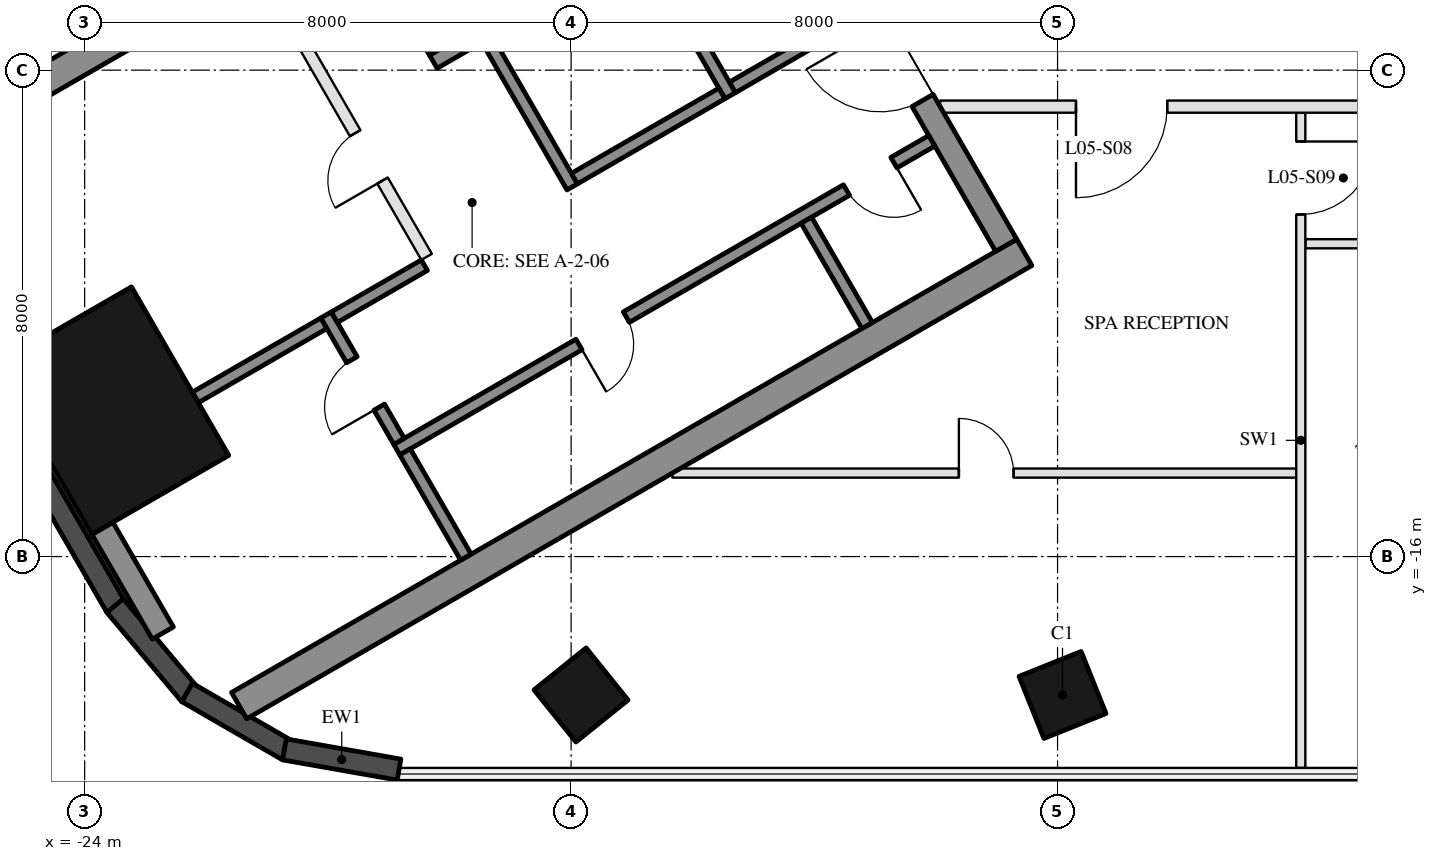
"""IFC4 building model, lengths in metres.
Left out: names, types, materials, properties, quantities, classifications, styles, units other than length and angle.
Written with IfcOpenShell. Run it as: python <this file> out.ifc"""

import sys

from ifc_helpers import new_model, si_unit, direction, frame, frame_2d, origin, origin_2d, place, context, subcontext, project, spatial, rectangle, hollow_rectangle, extrude, boolean, halfspace, element, fill, save


model = new_model("IFC4")
c1 = context("Model", 3, precision=1e-05, world=origin(), true_north=direction((0.0, 1.0)))
c2 = subcontext(c1, "Body", "Model", "MODEL_VIEW")
j1 = project(units=[si_unit("LENGTHUNIT", "METRE"), si_unit("PLANEANGLEUNIT", "RADIAN")], contexts=[c1])
p1 = place(None, origin())
s1 = spatial("IfcSite", under=j1, at=p1, CompositionType="ELEMENT")
p2 = place(p1, origin())
s2 = spatial("IfcBuilding", under=s1, at=p2, CompositionType="ELEMENT")
p3 = place(p2, frame((0.0, 0.0, 33.0)))
s3 = spatial("IfcBuildingStorey", under=s2, at=p3, CompositionType="ELEMENT", Elevation=33.0)
p4 = place(p3, frame((-15.837, -18.276, 0.0), z_axis=(0.008245813936, 0.010253018645, 0.999913437334), x_axis=(-0.999965935277, -0.000282647683, 0.008249145105)))
e1 = element("IfcColumn", 1, at=p4, inside=s3, PredefinedType="COLUMN", context=c2, shape_type="SweptSolid", body=[
    boolean("DIFFERENCE", boolean("DIFFERENCE", extrude(hollow_rectangle(XDim=1.1, YDim=1.1, WallThickness=0.05, at=origin_2d()), origin(), (0.0, 0.0, 1.0), 4.5), halfspace(frame((0.0, 0.0, 0.012), z_axis=(0.0, 0.0, 1.0), x_axis=(1.0, 0.0, 0.0)), True)), halfspace(frame((0.0, 0.0, 4.493), z_axis=(0.0, 0.0, 1.0), x_axis=(1.0, 0.0, 0.0)), False)),
])
p5 = place(p3, frame((-7.918, -18.276, 0.0), z_axis=(0.004123012096, 0.010253280081, 0.999938933645), x_axis=(-0.999991272744, 0.000716936113, 0.004115876508)))
e2 = element("IfcColumn", 2, at=p5, inside=s3, PredefinedType="COLUMN", context=c2, shape_type="SweptSolid", body=[
    boolean("DIFFERENCE", boolean("DIFFERENCE", extrude(hollow_rectangle(XDim=1.1, YDim=1.1, WallThickness=0.05, at=origin_2d()), origin(), (0.0, 0.0, 1.0), 4.5), halfspace(frame((0.0, 0.0, 0.01), z_axis=(0.0, 0.0, 1.0), x_axis=(1.0, 0.0, 0.0)), True)), halfspace(frame((0.0, 0.0, 4.494), z_axis=(0.0, 0.0, 1.0), x_axis=(1.0, 0.0, 0.0)), False)),
])
p6 = place(p3, frame((-23.556, -13.6, 0.0), z_axis=(0.0, 0.0, 1.0), x_axis=(-0.5, 0.866025403784, 0.0)))
e3 = element("IfcColumn", 3, at=p6, inside=s3, PredefinedType="COLUMN", context=c2, shape_type="SweptSolid", body=[
    extrude(hollow_rectangle(XDim=3.2, YDim=2.6, WallThickness=0.08, at=origin_2d()), origin(), (0.0, 0.0, 1.0), 4.5),
])
p7 = place(p3, frame((-26.318, -11.921, 0.0), z_axis=(0.0, 0.0, 1.0), x_axis=(0.499982068559, -0.866035756259, 0.0)))
e4 = element("IfcWall", 4, at=p7, inside=s3, PredefinedType="SOLIDWALL", context=c2, shape_type="SweptSolid", body=[
    extrude(rectangle(XDim=5.671, YDim=0.35, at=frame_2d((2.835, 0.0))), origin(), (0.0, 0.0, 1.0), 4.2),
])
p8 = place(p3, frame((-23.5, -16.807, 0.0), z_axis=(0.0, 0.0, 1.0), x_axis=(0.64282715853, -0.766011255959, 0.0)))
e5 = element("IfcWall", 5, at=p8, inside=s3, PredefinedType="SOLIDWALL", context=c2, shape_type="SweptSolid", body=[
    extrude(rectangle(XDim=1.915, YDim=0.35, at=frame_2d((0.957, 0.0))), origin(), (0.0, 0.0, 1.0), 4.2),
])
p9 = place(p3, frame((-22.316, -18.235, 0.0), z_axis=(0.0, 0.0, 1.0), x_axis=(0.865990234582, -0.500060909899, 0.0)))
e6 = element("IfcWall", 6, at=p9, inside=s3, PredefinedType="SOLIDWALL", context=c2, shape_type="SweptSolid", body=[
    extrude(rectangle(XDim=1.915, YDim=0.35, at=frame_2d((0.958, 0.0))), origin(), (0.0, 0.0, 1.0), 4.2),
])
p10 = place(p3, frame((-20.715, -19.171, 0.0), z_axis=(0.0, 0.0, 1.0), x_axis=(0.984824611058, -0.173552543785, 0.0)))
e7 = element("IfcWall", 7, at=p10, inside=s3, PredefinedType="SOLIDWALL", context=c2, shape_type="SweptSolid", body=[
    extrude(rectangle(XDim=1.915, YDim=0.35, at=frame_2d((0.957, 0.0))), origin(), (0.0, 0.0, 1.0), 4.2),
])
for number, where, z_axis, x_axis in (
    (8, (-13.797, -1.903, 0.0), (0.0, 0.0, 1.0), (-0.866, -0.5, 0.0)),
    (9, (-8.547, -10.997, 0.0), (0.0, 0.0, 1.0), (-0.866, -0.5, 0.0)),
):
    element("IfcWall", number, at=place(p3, frame(where, z_axis=z_axis, x_axis=x_axis)), inside=s3, PredefinedType="SHEAR", context=c2, shape_type="SweptSolid", body=[
        extrude(rectangle(XDim=14.91, YDim=0.5, at=frame_2d((7.455, 0.0))), origin(), (0.0, 0.0, 1.0), 4.2),
    ])
p11 = place(p3, frame((-13.845, -2.22, 0.0), z_axis=(0.0, 0.0, 1.0), x_axis=(0.500004234368, -0.866022959057, 0.0)))
e10 = element("IfcWall", 10, at=p11, inside=s3, PredefinedType="SHEAR", context=c2, shape_type="SweptSolid", body=[
    extrude(rectangle(XDim=10.0, YDim=0.4, at=frame_2d((5.0, 0.0))), origin(), (0.0, 0.0, 1.0), 4.2),
])
p12 = place(p11, frame((3.55, 0.0, 0.0)))
e11 = element("IfcOpeningElement", 11, at=p12, cuts=e10, PredefinedType="OPENING", context=c2, shape_type="SweptSolid", body=[
    extrude(rectangle(XDim=1.1, YDim=2.1, at=frame_2d((0.55, 1.05))), frame((0.0, 0.21, 0.0), z_axis=(0.0, -1.0, 0.0), x_axis=(1.0, 0.0, 0.0)), (0.0, 0.0, 1.0), 0.42),
])
p13 = place(p11, frame((5.85, 0.0, 0.0)))
e12 = element("IfcOpeningElement", 12, at=p13, cuts=e10, PredefinedType="OPENING", context=c2, shape_type="SweptSolid", body=[
    extrude(rectangle(XDim=1.4, YDim=2.1, at=frame_2d((0.7, 1.05))), frame((0.0, 0.21, 0.0), z_axis=(0.0, -1.0, 0.0), x_axis=(1.0, 0.0, 0.0)), (0.0, 0.0, 1.0), 0.42),
])
p14 = place(p3, frame((-23.708, -15.536, 0.0), z_axis=(0.0, 0.0, 1.0), x_axis=(0.499927872096, -0.866067042845, 0.0)))
e13 = element("IfcWall", 13, at=p14, inside=s3, PredefinedType="SHEAR", context=c2, shape_type="SweptSolid", body=[
    extrude(rectangle(XDim=1.989, YDim=0.4, at=frame_2d((0.995, 0.0))), origin(), (0.0, 0.0, 1.0), 4.2),
])
p15 = place(p3, frame((-12.681, -4.636, 0.0), z_axis=(0.0, 0.0, 1.0), x_axis=(-0.866021702275, -0.500006411147, 0.0)))
e14 = element("IfcWall", 14, at=p15, inside=s3, PredefinedType="SHEAR", context=c2, shape_type="SweptSolid", body=[
    extrude(rectangle(XDim=6.45, YDim=0.25, at=frame_2d((3.225, 0.0))), origin(), (0.0, 0.0, 1.0), 4.2),
])
p16 = place(p15, frame((0.3, 0.0, 0.0)))
e15 = element("IfcOpeningElement", 15, at=p16, cuts=e14, PredefinedType="OPENING", context=c2, shape_type="SweptSolid", body=[
    extrude(rectangle(XDim=1.0, YDim=2.1, at=frame_2d((0.5, 1.05))), frame((0.0, 0.135, 0.0), z_axis=(0.0, -1.0, 0.0), x_axis=(1.0, 0.0, 0.0)), (0.0, 0.0, 1.0), 0.27),
])
p17 = place(p3, frame((-19.496, -5.482, 0.0), z_axis=(0.0, 0.0, 1.0), x_axis=(0.499990435942, -0.866030925526, 0.0)))
e16 = element("IfcWall", 16, at=p17, inside=s3, PredefinedType="SHEAR", context=c2, shape_type="SweptSolid", body=[
    extrude(rectangle(XDim=2.55, YDim=0.25, at=frame_2d((1.275, 0.0))), origin(), (0.0, 0.0, 1.0), 4.2),
])
p18 = place(p3, frame((-17.381, -7.495, 0.0), z_axis=(0.0, 0.0, 1.0), x_axis=(0.500011755427, -0.866018616679, 0.0)))
e17 = element("IfcWall", 17, at=p18, inside=s3, PredefinedType="SHEAR", context=c2, shape_type="SweptSolid", body=[
    extrude(rectangle(XDim=2.8, YDim=0.2, at=frame_2d((1.4, 0.0))), origin(), (0.0, 0.0, 1.0), 4.2),
])
p19 = place(p3, frame((-14.783, -5.995, 0.0), z_axis=(0.0, 0.0, 1.0), x_axis=(0.49994636267, -0.866056369097, 0.0)))
e18 = element("IfcWall", 18, at=p19, inside=s3, PredefinedType="SHEAR", context=c2, shape_type="SweptSolid", body=[
    extrude(rectangle(XDim=2.8, YDim=0.2, at=frame_2d((1.4, 0.0))), origin(), (0.0, 0.0, 1.0), 4.2),
])
p20 = place(p19, frame((0.7, 0.0, 0.0)))
e19 = element("IfcOpeningElement", 19, at=p20, cuts=e18, PredefinedType="OPENING", context=c2, shape_type="SweptSolid", body=[
    extrude(rectangle(XDim=1.2, YDim=2.1, at=frame_2d((0.6, 1.05))), frame((0.0, 0.11, 0.0), z_axis=(0.0, -1.0, 0.0), x_axis=(1.0, 0.0, 0.0)), (0.0, 0.0, 1.0), 0.22),
])
p21 = place(p3, frame((-13.52, -8.383, 0.0), z_axis=(0.0, 0.0, 1.0), x_axis=(-0.866034573852, -0.49998411664, 0.0)))
e20 = element("IfcWall", 20, at=p21, inside=s3, PredefinedType="SHEAR", context=c2, shape_type="SweptSolid", body=[
    extrude(rectangle(XDim=2.8, YDim=0.2, at=frame_2d((1.4, 0.0))), origin(), (0.0, 0.0, 1.0), 4.2),
])
p22 = place(p3, frame((-11.268, -7.083, 0.0), z_axis=(0.0, 0.0, 1.0), x_axis=(-0.866050077142, -0.499957262057, 0.0)))
e21 = element("IfcWall", 21, at=p22, inside=s3, PredefinedType="SHEAR", context=c2, shape_type="SweptSolid", body=[
    extrude(rectangle(XDim=2.4, YDim=0.2, at=frame_2d((1.2, 0.0))), origin(), (0.0, 0.0, 1.0), 4.2),
])
p23 = place(p3, frame((-10.068, -9.162, 0.0), z_axis=(0.0, 0.0, 1.0), x_axis=(-0.866032725843, -0.499987317609, 0.0)))
e22 = element("IfcWall", 22, at=p23, inside=s3, PredefinedType="SHEAR", context=c2, shape_type="SweptSolid", body=[
    extrude(rectangle(XDim=10.16, YDim=0.2, at=frame_2d((5.08, 0.0))), origin(), (0.0, 0.0, 1.0), 4.2),
])
p24 = place(p23, frame((0.72, 0.0, 0.0)))
e23 = element("IfcOpeningElement", 23, at=p24, cuts=e22, PredefinedType="OPENING", context=c2, shape_type="SweptSolid", body=[
    extrude(rectangle(XDim=0.9, YDim=2.1, at=frame_2d((0.45, 1.05))), frame((0.0, 0.11, 0.0), z_axis=(0.0, -1.0, 0.0), x_axis=(1.0, 0.0, 0.0)), (0.0, 0.0, 1.0), 0.22),
])
p25 = place(p23, frame((5.8, 0.0, 0.0)))
e24 = element("IfcOpeningElement", 24, at=p25, cuts=e22, PredefinedType="OPENING", context=c2, shape_type="SweptSolid", body=[
    extrude(rectangle(XDim=0.9, YDim=2.1, at=frame_2d((0.45, 1.05))), frame((0.0, 0.11, 0.0), z_axis=(0.0, -1.0, 0.0), x_axis=(1.0, 0.0, 0.0)), (0.0, 0.0, 1.0), 0.22),
])
p26 = place(p3, frame((-20.031, -12.026, 0.0), z_axis=(0.0, 0.0, 1.0), x_axis=(0.500033551112, -0.866006032174, 0.0)))
e25 = element("IfcWall", 25, at=p26, inside=s3, PredefinedType="SHEAR", context=c2, shape_type="SweptSolid", body=[
    extrude(rectangle(XDim=2.4, YDim=0.2, at=frame_2d((1.2, 0.0))), origin(), (0.0, 0.0, 1.0), 4.2),
])
p27 = place(p26, frame((0.85, 0.0, 0.0)))
e26 = element("IfcOpeningElement", 26, at=p27, cuts=e25, PredefinedType="OPENING", context=c2, shape_type="SweptSolid", body=[
    extrude(rectangle(XDim=0.9, YDim=2.1, at=frame_2d((0.45, 1.05))), frame((0.0, 0.11, 0.0), z_axis=(0.0, -1.0, 0.0), x_axis=(1.0, 0.0, 0.0)), (0.0, 0.0, 1.0), 0.22),
])
p28 = place(p3, frame((-18.413, -11.208, 0.0), z_axis=(0.0, 0.0, 1.0), x_axis=(-0.866038183914, -0.499977863513, 0.0)))
e27 = element("IfcWall", 27, at=p28, inside=s3, PredefinedType="SHEAR", context=c2, shape_type="SweptSolid", body=[
    extrude(rectangle(XDim=1.71, YDim=0.2, at=frame_2d((0.855, 0.0))), origin(), (0.0, 0.0, 1.0), 4.2),
])
for number, where, z_axis, x_axis in (
    (28, (-12.131, -10.468, 0.0), (0.0, 0.0, 1.0), (0.5, -0.866, 0.0)),
    (29, (-18.73, -14.278, 0.0), (0.0, 0.0, 1.0), (0.5, -0.866, 0.0)),
):
    element("IfcWall", number, at=place(p3, frame(where, z_axis=z_axis, x_axis=x_axis)), inside=s3, PredefinedType="SHEAR", context=c2, shape_type="SweptSolid", body=[
        extrude(rectangle(XDim=2.0, YDim=0.2, at=frame_2d((1.0, 0.0))), origin(), (0.0, 0.0, 1.0), 4.2),
    ])
p29 = place(p3, frame((-20.067, -12.163, 0.0), z_axis=(0.0, 0.0, 1.0), x_axis=(-0.866048967903, -0.499959183527, 0.0)))
e30 = element("IfcWall", 30, at=p29, inside=s3, PredefinedType="SHEAR", context=c2, shape_type="SweptSolid", body=[
    extrude(rectangle(XDim=2.44, YDim=0.2, at=frame_2d((1.22, 0.0))), origin(), (0.0, 0.0, 1.0), 4.2),
])
p30 = place(p3, frame((-21.076, -6.395, 0.0), z_axis=(0.0, 0.0, 1.0), x_axis=(0.50001468107, -0.866016927499, 0.0)))
e31 = element("IfcWall", 31, at=p30, inside=s3, PredefinedType="PARTITIONING", context=c2, shape_type="SweptSolid", body=[
    extrude(rectangle(XDim=5.4, YDim=0.2, at=frame_2d((2.7, 0.0))), origin(), (0.0, 0.0, 1.0), 4.2),
])
p31 = place(p30, frame((3.05, 0.0, 0.0)))
e32 = element("IfcOpeningElement", 32, at=p31, cuts=e31, PredefinedType="OPENING", context=c2, shape_type="SweptSolid", body=[
    extrude(rectangle(XDim=0.9, YDim=2.1, at=frame_2d((0.45, 1.05))), frame((0.0, 0.11, 0.0), z_axis=(0.0, -1.0, 0.0), x_axis=(1.0, 0.0, 0.0)), (0.0, 0.0, 1.0), 0.22),
])
p32 = place(p3, frame((-14.335, -14.627, 0.0), z_axis=(0.0, 0.0, 1.0), x_axis=(1.0, 0.0, 0.0)))
e33 = element("IfcWall", 33, at=p32, inside=s3, PredefinedType="PARTITIONING", context=c2, shape_type="SweptSolid", body=[
    extrude(rectangle(XDim=10.26, YDim=0.15, at=frame_2d((5.13, 0.0))), origin(), (0.0, 0.0, 1.0), 3.41),
])
p33 = place(p32, frame((4.712, 0.0, 0.0)))
e34 = element("IfcOpeningElement", 34, at=p33, cuts=e33, PredefinedType="OPENING", context=c2, shape_type="SweptSolid", body=[
    extrude(rectangle(XDim=0.9, YDim=2.1, at=frame_2d((0.45, 1.05))), frame((0.0, 0.085, 0.0), z_axis=(0.0, -1.0, 0.0), x_axis=(1.0, 0.0, 0.0)), (0.0, 0.0, 1.0), 0.17),
])
p34 = place(p3, frame((-3.925, -10.855, 0.0), z_axis=(0.0, 0.0, 1.0), x_axis=(1.0, 0.0, 0.0)))
e35 = element("IfcWall", 35, at=p34, inside=s3, PredefinedType="PARTITIONING", context=c2, shape_type="SweptSolid", body=[
    extrude(rectangle(XDim=12.553, YDim=0.15, at=frame_2d((6.277, 0.0))), origin(), (0.0, 0.0, 1.0), 3.41),
])
p35 = place(p34, frame((1.983, 0.0, 0.0)))
e36 = element("IfcOpeningElement", 36, at=p35, cuts=e35, PredefinedType="OPENING", context=c2, shape_type="SweptSolid", body=[
    extrude(rectangle(XDim=0.9, YDim=2.1, at=frame_2d((0.45, 1.05))), frame((0.0, 0.085, 0.0), z_axis=(0.0, -1.0, 0.0), x_axis=(1.0, 0.0, 0.0)), (0.0, 0.0, 1.0), 0.17),
])
p36 = place(p34, frame((6.45, 0.0, 0.0)))
e37 = element("IfcOpeningElement", 37, at=p36, cuts=e35, PredefinedType="OPENING", context=c2, shape_type="SweptSolid", body=[
    extrude(rectangle(XDim=0.9, YDim=2.1, at=frame_2d((0.45, 1.05))), frame((0.0, 0.085, 0.0), z_axis=(0.0, -1.0, 0.0), x_axis=(1.0, 0.0, 0.0)), (0.0, 0.0, 1.0), 0.17),
])
p37 = place(p34, frame((10.294, 0.0, 0.0)))
e38 = element("IfcOpeningElement", 38, at=p37, cuts=e35, PredefinedType="OPENING", context=c2, shape_type="SweptSolid", body=[
    extrude(rectangle(XDim=0.9, YDim=2.1, at=frame_2d((0.45, 1.05))), frame((0.0, 0.085, 0.0), z_axis=(0.0, -1.0, 0.0), x_axis=(1.0, 0.0, 0.0)), (0.0, 0.0, 1.0), 0.17),
])
p38 = place(p3, frame((-4.0, -19.476, 0.0), z_axis=(0.0, 0.0, 1.0), x_axis=(0.0, 1.0, 0.0)))
e39 = element("IfcWall", 39, at=p38, inside=s3, PredefinedType="PARTITIONING", context=c2, shape_type="SweptSolid", body=[
    extrude(rectangle(XDim=10.776, YDim=0.15, at=frame_2d((5.388, 0.0))), origin(), (0.0, 0.0, 1.0), 3.41),
])
p39 = place(p38, frame((9.103, 0.0, 0.0)))
e40 = element("IfcOpeningElement", 40, at=p39, cuts=e39, PredefinedType="OPENING", context=c2, shape_type="SweptSolid", body=[
    extrude(rectangle(XDim=1.2, YDim=2.1, at=frame_2d((0.6, 1.05))), frame((0.0, 0.085, 0.0), z_axis=(0.0, -1.0, 0.0), x_axis=(1.0, 0.0, 0.0)), (0.0, 0.0, 1.0), 0.17),
])
p40 = place(p3, frame((-9.93, -8.6, 0.0), z_axis=(0.0, 0.0, 1.0), x_axis=(1.0, 0.0, 0.0)))
e41 = element("IfcWall", 41, at=p40, inside=s3, PredefinedType="PARTITIONING", context=c2, shape_type="SweptSolid", body=[
    extrude(rectangle(XDim=19.861, YDim=0.2, at=frame_2d((9.93, 0.0))), origin(), (0.0, 0.0, 1.0), 3.41),
])
p41 = place(p40, frame((2.234, 0.0, 0.0)))
e42 = element("IfcOpeningElement", 42, at=p41, cuts=e41, PredefinedType="OPENING", context=c2, shape_type="SweptSolid", body=[
    extrude(rectangle(XDim=1.5, YDim=2.1, at=frame_2d((0.75, 1.05))), frame((0.0, 0.11, 0.0), z_axis=(0.0, -1.0, 0.0), x_axis=(1.0, 0.0, 0.0)), (0.0, 0.0, 1.0), 0.22),
])
p42 = place(p40, frame((12.278, 0.0, 0.0)))
e43 = element("IfcOpeningElement", 43, at=p42, cuts=e41, PredefinedType="OPENING", context=c2, shape_type="SweptSolid", body=[
    extrude(rectangle(XDim=1.2, YDim=2.1, at=frame_2d((0.6, 1.05))), frame((0.0, 0.11, 0.0), z_axis=(0.0, -1.0, 0.0), x_axis=(1.0, 0.0, 0.0)), (0.0, 0.0, 1.0), 0.22),
])
p43 = place(p24, origin())
e44 = element("IfcDoor", 44, at=p43, inside=s3, OperationType="SINGLE_SWING_LEFT", PredefinedType="DOOR", context=c2, shape_type="SweptSolid", body=[
    extrude(rectangle(XDim=0.9, YDim=2.1, at=frame_2d((0.45, 1.05))), frame((0.0, 0.025, 0.0), z_axis=(0.0, -1.0, 0.0), x_axis=(1.0, 0.0, 0.0)), (0.0, 0.0, 1.0), 0.05),
])
fill(e23, e44)
p44 = place(p25, origin())
e45 = element("IfcDoor", 45, at=p44, inside=s3, OperationType="SINGLE_SWING_RIGHT", PredefinedType="DOOR", context=c2, shape_type="SweptSolid", body=[
    extrude(rectangle(XDim=0.9, YDim=2.1, at=frame_2d((0.45, 1.05))), frame((0.0, 0.025, 0.0), z_axis=(0.0, -1.0, 0.0), x_axis=(1.0, 0.0, 0.0)), (0.0, 0.0, 1.0), 0.05),
])
fill(e24, e45)
p45 = place(p27, frame((0.9, 0.0, 0.0), z_axis=(0.0, 0.0, 1.0), x_axis=(-1.0, 0.0, 0.0)))
e46 = element("IfcDoor", 46, at=p45, inside=s3, OperationType="SINGLE_SWING_LEFT", PredefinedType="DOOR", context=c2, shape_type="SweptSolid", body=[
    extrude(rectangle(XDim=0.9, YDim=2.1, at=frame_2d((0.45, 1.05))), frame((0.0, 0.025, 0.0), z_axis=(0.0, -1.0, 0.0), x_axis=(1.0, 0.0, 0.0)), (0.0, 0.0, 1.0), 0.05),
])
fill(e26, e46)
p46 = place(p31, frame((0.9, 0.0, 0.0), z_axis=(0.0, 0.0, 1.0), x_axis=(-1.0, 0.0, 0.0)))
e47 = element("IfcDoor", 47, at=p46, inside=s3, OperationType="SINGLE_SWING_LEFT", PredefinedType="DOOR", context=c2, shape_type="SweptSolid", body=[
    extrude(rectangle(XDim=0.9, YDim=2.1, at=frame_2d((0.45, 1.05))), frame((0.0, 0.025, 0.0), z_axis=(0.0, -1.0, 0.0), x_axis=(1.0, 0.0, 0.0)), (0.0, 0.0, 1.0), 0.05),
])
fill(e32, e47)
p47 = place(p13, frame((1.4, 0.0, 0.0), z_axis=(0.0, 0.0, 1.0), x_axis=(-1.0, 0.0, 0.0)))
e48 = element("IfcDoor", 48, at=p47, inside=s3, OperationType="DOUBLE_DOOR_SINGLE_SWING", PredefinedType="DOOR", context=c2, shape_type="SweptSolid", body=[
    extrude(rectangle(XDim=1.4, YDim=2.1, at=frame_2d((0.7, 1.05))), frame((0.0, 0.025, 0.0), z_axis=(0.0, -1.0, 0.0), x_axis=(1.0, 0.0, 0.0)), (0.0, 0.0, 1.0), 0.05),
])
fill(e12, e48)
p48 = place(p41, frame((1.5, 0.0, 0.0), z_axis=(0.0, 0.0, 1.0), x_axis=(-1.0, 0.0, 0.0)))
e49 = element("IfcDoor", 49, at=p48, inside=s3, OperationType="DOUBLE_DOOR_SINGLE_SWING", PredefinedType="DOOR", context=c2, shape_type="SweptSolid", body=[
    extrude(rectangle(XDim=1.5, YDim=2.1, at=frame_2d((0.75, 1.05))), frame((0.0, 0.025, 0.0), z_axis=(0.0, -1.0, 0.0), x_axis=(1.0, 0.0, 0.0)), (0.0, 0.0, 1.0), 0.05),
])
fill(e42, e49)
p49 = place(p39, frame((1.2, 0.0, 0.0), z_axis=(0.0, 0.0, 1.0), x_axis=(-1.0, 0.0, 0.0)))
e50 = element("IfcDoor", 50, at=p49, inside=s3, OperationType="SINGLE_SWING_LEFT", PredefinedType="DOOR", context=c2, shape_type="SweptSolid", body=[
    extrude(rectangle(XDim=1.2, YDim=2.1, at=frame_2d((0.6, 1.05))), frame((0.0, 0.025, 0.0), z_axis=(0.0, -1.0, 0.0), x_axis=(1.0, 0.0, 0.0)), (0.0, 0.0, 1.0), 0.05),
])
fill(e40, e50)
p50 = place(p33, origin())
e51 = element("IfcDoor", 51, at=p50, inside=s3, OperationType="SINGLE_SWING_LEFT", PredefinedType="DOOR", context=c2, shape_type="SweptSolid", body=[
    extrude(rectangle(XDim=0.9, YDim=2.1, at=frame_2d((0.45, 1.05))), frame((0.0, 0.025, 0.0), z_axis=(0.0, -1.0, 0.0), x_axis=(1.0, 0.0, 0.0)), (0.0, 0.0, 1.0), 0.05),
])
fill(e34, e51)
save(model, sys.argv[1])
